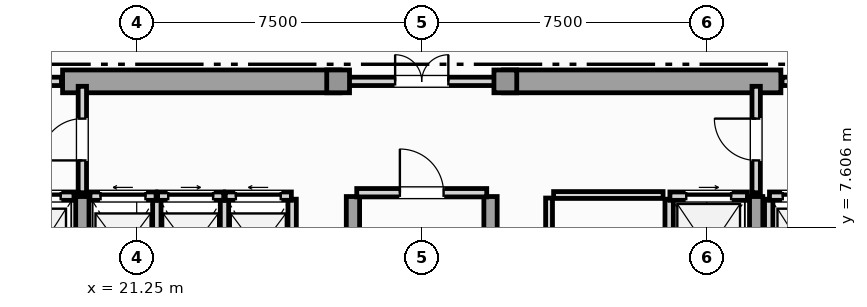
"""IFC4 building model, lengths in metres.
Left out: names, types, materials, properties, quantities, classifications, styles, units other than length and angle.
Written with IfcOpenShell. Run it as: python <this file> out.ifc"""

import sys

from ifc_helpers import new_model, si_unit, direction, frame, frame_2d, origin, origin_2d, place, context, subcontext, project, spatial, rectangle, extrude, element, fill, save


model = new_model("IFC4")
c1 = context("Model", 3, precision=1e-05, world=origin(), true_north=direction((0.0, 1.0)))
c2 = subcontext(c1, "Body", "Model", "MODEL_VIEW")
j1 = project(units=[si_unit("LENGTHUNIT", "METRE"), si_unit("PLANEANGLEUNIT", "RADIAN")], contexts=[c1])
p1 = place(None, origin())
s1 = spatial("IfcSite", under=j1, at=p1, CompositionType="ELEMENT")
p2 = place(p1, origin())
s2 = spatial("IfcBuilding", under=s1, at=p2, CompositionType="ELEMENT")
p3 = place(p2, frame((0.0, 0.0, 260.6)))
s3 = spatial("IfcBuildingStorey", under=s2, at=p3, CompositionType="ELEMENT", Elevation=260.6)
for number, where, z_axis, x_axis in (
    (1, (19.3, 11.45, 0.0), (0.0, 0.0, 1.0), (1.0, 0.0, 0.0)),
    (2, (30.9, 11.45, 0.0), (0.0, 0.0, 1.0), (1.0, 0.0, 0.0)),
):
    element("IfcWall", number, at=place(p3, frame(where, z_axis=z_axis, x_axis=x_axis)), inside=s3, PredefinedType="SHEAR", context=c2, shape_type="SweptSolid", body=[
        extrude(rectangle(XDim=7.3, YDim=0.6, at=frame_2d((3.65, 0.0))), origin(), (0.0, 0.0, 1.0), 3.65),
    ])
for number, where, z_axis, x_axis in (
    (3, (19.82, 0.92, 0.0), (0.0, 0.0, 1.0), (0.0, 1.0, 0.0)),
    (4, (26.94, 0.92, 0.0), (0.0, 0.0, 1.0), (0.0, 1.0, 0.0)),
    (5, (30.56, 0.92, 0.0), (0.0, 0.0, 1.0), (0.0, 1.0, 0.0)),
    (6, (37.55, 0.92, 0.0), (0.0, 0.0, 1.0), (0.0, 1.0, 0.0)),
):
    element("IfcWall", number, at=place(p3, frame(where, z_axis=z_axis, x_axis=x_axis)), inside=s3, PredefinedType="SHEAR", context=c2, shape_type="SweptSolid", body=[
        extrude(rectangle(XDim=7.5, YDim=0.35, at=frame_2d((3.75, 0.0))), origin(), (0.0, 0.0, 1.0), 3.65),
    ])
for number, where, z_axis, x_axis in (
    (7, (26.55, 11.45, 0.0), (0.0, 0.0, 1.0), (1.0, 0.0, 0.0)),
    (8, (30.95, 11.45, 0.0), (0.0, 0.0, 1.0), (1.0, 0.0, 0.0)),
):
    element("IfcColumn", number, at=place(p3, frame(where, z_axis=z_axis, x_axis=x_axis)), inside=s3, PredefinedType="COLUMN", context=c2, shape_type="SweptSolid", body=[
        extrude(rectangle(XDim=0.6, YDim=0.6, at=origin_2d()), origin(), (0.0, 0.0, 1.0), 3.85),
    ])
p4 = place(p3, frame((17.78, 8.43, 0.0), z_axis=(0.0, 0.0, 1.0), x_axis=(1.0, 0.0, 0.0)))
e9 = element("IfcWall", 9, at=p4, inside=s3, PredefinedType="SOLIDWALL", context=c2, shape_type="SweptSolid", body=[
    extrude(rectangle(XDim=1.82, YDim=0.22, at=frame_2d((0.91, 0.0))), origin(), (0.0, 0.0, 1.0), 3.65),
])
p5 = place(p4, frame((0.35, 0.0, 0.0)))
e10 = element("IfcOpeningElement", 10, at=p5, cuts=e9, PredefinedType="OPENING", context=c2, shape_type="SweptSolid", body=[
    extrude(rectangle(XDim=1.12, YDim=2.25, at=frame_2d((0.56, 1.125))), frame((0.0, 0.12, 0.0), z_axis=(0.0, -1.0, 0.0), x_axis=(1.0, 0.0, 0.0)), (0.0, 0.0, 1.0), 0.24),
])
p6 = place(p3, frame((37.88, 5.65, 0.0), z_axis=(0.0, 0.0, 1.0), x_axis=(0.0, 1.0, 0.0)))
e11 = element("IfcWall", 11, at=p6, inside=s3, PredefinedType="SOLIDWALL", context=c2, shape_type="SweptSolid", body=[
    extrude(rectangle(XDim=2.7, YDim=0.22, at=frame_2d((1.35, 0.0))), origin(), (0.0, 0.0, 1.0), 3.65),
])
p7 = place(p3, frame((37.9, 8.43, 0.0), z_axis=(0.0, 0.0, 1.0), x_axis=(1.0, 0.0, 0.0)))
e12 = element("IfcWall", 12, at=p7, inside=s3, PredefinedType="SOLIDWALL", context=c2, shape_type="SweptSolid", body=[
    extrude(rectangle(XDim=1.82, YDim=0.22, at=frame_2d((0.91, 0.0))), origin(), (0.0, 0.0, 1.0), 3.65),
])
p8 = place(p7, frame((0.35, 0.0, 0.0)))
e13 = element("IfcOpeningElement", 13, at=p8, cuts=e12, PredefinedType="OPENING", context=c2, shape_type="SweptSolid", body=[
    extrude(rectangle(XDim=1.12, YDim=2.25, at=frame_2d((0.56, 1.125))), frame((0.0, 0.12, 0.0), z_axis=(0.0, -1.0, 0.0), x_axis=(1.0, 0.0, 0.0)), (0.0, 0.0, 1.0), 0.24),
])
p9 = place(p3, frame((35.26, 5.65, 0.0), z_axis=(0.0, 0.0, 1.0), x_axis=(0.0, 1.0, 0.0)))
e14 = element("IfcWall", 14, at=p9, inside=s3, PredefinedType="SOLIDWALL", context=c2, shape_type="SweptSolid", body=[
    extrude(rectangle(XDim=2.7, YDim=0.22, at=frame_2d((1.35, 0.0))), origin(), (0.0, 0.0, 1.0), 3.65),
])
p10 = place(p3, frame((35.28, 8.43, 0.0), z_axis=(0.0, 0.0, 1.0), x_axis=(1.0, 0.0, 0.0)))
e15 = element("IfcWall", 15, at=p10, inside=s3, PredefinedType="SOLIDWALL", context=c2, shape_type="SweptSolid", body=[
    extrude(rectangle(XDim=2.04, YDim=0.22, at=frame_2d((1.02, 0.0))), origin(), (0.0, 0.0, 1.0), 3.65),
])
p11 = place(p10, frame((0.43, 0.0, 0.0)))
e16 = element("IfcOpeningElement", 16, at=p11, cuts=e15, PredefinedType="OPENING", context=c2, shape_type="SweptSolid", body=[
    extrude(rectangle(XDim=1.18, YDim=2.2, at=frame_2d((0.59, 1.1))), frame((0.0, 0.12, 0.0), z_axis=(0.0, -1.0, 0.0), x_axis=(1.0, 0.0, 0.0)), (0.0, 0.0, 1.0), 0.24),
])
p12 = place(p3, frame((21.78, 5.65, 0.0), z_axis=(0.0, 0.0, 1.0), x_axis=(0.0, 1.0, 0.0)))
e17 = element("IfcWall", 17, at=p12, inside=s3, PredefinedType="SOLIDWALL", context=c2, shape_type="SweptSolid", body=[
    extrude(rectangle(XDim=2.7, YDim=0.22, at=frame_2d((1.35, 0.0))), origin(), (0.0, 0.0, 1.0), 3.65),
])
p13 = place(p3, frame((20.02, 8.43, 0.0), z_axis=(0.0, 0.0, 1.0), x_axis=(1.0, 0.0, 0.0)))
e18 = element("IfcWall", 18, at=p13, inside=s3, PredefinedType="SOLIDWALL", context=c2, shape_type="SweptSolid", body=[
    extrude(rectangle(XDim=1.74, YDim=0.22, at=frame_2d((0.87, 0.0))), origin(), (0.0, 0.0, 1.0), 3.65),
])
p14 = place(p13, frame((0.28, 0.0, 0.0)))
e19 = element("IfcOpeningElement", 19, at=p14, cuts=e18, PredefinedType="OPENING", context=c2, shape_type="SweptSolid", body=[
    extrude(rectangle(XDim=1.18, YDim=2.2, at=frame_2d((0.59, 1.1))), frame((0.0, 0.12, 0.0), z_axis=(0.0, -1.0, 0.0), x_axis=(1.0, 0.0, 0.0)), (0.0, 0.0, 1.0), 0.24),
])
p15 = place(p3, frame((23.56, 5.65, 0.0), z_axis=(0.0, 0.0, 1.0), x_axis=(0.0, 1.0, 0.0)))
e20 = element("IfcWall", 20, at=p15, inside=s3, PredefinedType="SOLIDWALL", context=c2, shape_type="SweptSolid", body=[
    extrude(rectangle(XDim=2.7, YDim=0.22, at=frame_2d((1.35, 0.0))), origin(), (0.0, 0.0, 1.0), 3.65),
])
p16 = place(p3, frame((21.8, 8.43, 0.0), z_axis=(0.0, 0.0, 1.0), x_axis=(1.0, 0.0, 0.0)))
e21 = element("IfcWall", 21, at=p16, inside=s3, PredefinedType="SOLIDWALL", context=c2, shape_type="SweptSolid", body=[
    extrude(rectangle(XDim=1.74, YDim=0.22, at=frame_2d((0.87, 0.0))), origin(), (0.0, 0.0, 1.0), 3.65),
])
p17 = place(p16, frame((0.28, 0.0, 0.0)))
e22 = element("IfcOpeningElement", 22, at=p17, cuts=e21, PredefinedType="OPENING", context=c2, shape_type="SweptSolid", body=[
    extrude(rectangle(XDim=1.18, YDim=2.2, at=frame_2d((0.59, 1.1))), frame((0.0, 0.12, 0.0), z_axis=(0.0, -1.0, 0.0), x_axis=(1.0, 0.0, 0.0)), (0.0, 0.0, 1.0), 0.24),
])
p18 = place(p3, frame((25.34, 5.65, 0.0), z_axis=(0.0, 0.0, 1.0), x_axis=(0.0, 1.0, 0.0)))
e23 = element("IfcWall", 23, at=p18, inside=s3, PredefinedType="SOLIDWALL", context=c2, shape_type="SweptSolid", body=[
    extrude(rectangle(XDim=2.7, YDim=0.22, at=frame_2d((1.35, 0.0))), origin(), (0.0, 0.0, 1.0), 3.65),
])
p19 = place(p3, frame((23.58, 8.43, 0.0), z_axis=(0.0, 0.0, 1.0), x_axis=(1.0, 0.0, 0.0)))
e24 = element("IfcWall", 24, at=p19, inside=s3, PredefinedType="SOLIDWALL", context=c2, shape_type="SweptSolid", body=[
    extrude(rectangle(XDim=1.74, YDim=0.22, at=frame_2d((0.87, 0.0))), origin(), (0.0, 0.0, 1.0), 3.65),
])
p20 = place(p19, frame((0.28, 0.0, 0.0)))
e25 = element("IfcOpeningElement", 25, at=p20, cuts=e24, PredefinedType="OPENING", context=c2, shape_type="SweptSolid", body=[
    extrude(rectangle(XDim=1.18, YDim=2.2, at=frame_2d((0.59, 1.1))), frame((0.0, 0.12, 0.0), z_axis=(0.0, -1.0, 0.0), x_axis=(1.0, 0.0, 0.0)), (0.0, 0.0, 1.0), 0.24),
])
p21 = place(p3, frame((27.04, 8.52, 0.0), z_axis=(0.0, 0.0, 1.0), x_axis=(1.0, 0.0, 0.0)))
e26 = element("IfcWall", 26, at=p21, inside=s3, PredefinedType="SOLIDWALL", context=c2, shape_type="SweptSolid", body=[
    extrude(rectangle(XDim=3.42, YDim=0.22, at=frame_2d((1.71, 0.0))), origin(), (0.0, 0.0, 1.0), 3.65),
])
p22 = place(p21, frame((1.135, 0.0, 0.0)))
e27 = element("IfcOpeningElement", 27, at=p22, cuts=e26, PredefinedType="OPENING", context=c2, shape_type="SweptSolid", body=[
    extrude(rectangle(XDim=1.15, YDim=2.2, at=frame_2d((0.575, 1.1))), frame((0.0, 0.12, 0.0), z_axis=(0.0, -1.0, 0.0), x_axis=(1.0, 0.0, 0.0)), (0.0, 0.0, 1.0), 0.24),
])
p23 = place(p3, frame((19.82, 8.52, 0.0), z_axis=(0.0, 0.0, 1.0), x_axis=(0.0, 1.0, 0.0)))
e28 = element("IfcWall", 28, at=p23, inside=s3, PredefinedType="SOLIDWALL", context=c2, shape_type="SweptSolid", body=[
    extrude(rectangle(XDim=2.8, YDim=0.22, at=frame_2d((1.4, 0.0))), origin(), (0.0, 0.0, 1.0), 3.105),
])
p24 = place(p23, frame((0.85, 0.0, 0.0)))
e29 = element("IfcOpeningElement", 29, at=p24, cuts=e28, PredefinedType="OPENING", context=c2, shape_type="SweptSolid", body=[
    extrude(rectangle(XDim=1.1, YDim=2.2, at=frame_2d((0.55, 1.1))), frame((0.0, 0.12, 0.0), z_axis=(0.0, -1.0, 0.0), x_axis=(1.0, 0.0, 0.0)), (0.0, 0.0, 1.0), 0.24),
])
p25 = place(p3, frame((37.55, 8.52, 0.0), z_axis=(0.0, 0.0, 1.0), x_axis=(0.0, 1.0, 0.0)))
e30 = element("IfcWall", 30, at=p25, inside=s3, PredefinedType="SOLIDWALL", context=c2, shape_type="SweptSolid", body=[
    extrude(rectangle(XDim=2.8, YDim=0.22, at=frame_2d((1.4, 0.0))), origin(), (0.0, 0.0, 1.0), 3.105),
])
p26 = place(p25, frame((0.85, 0.0, 0.0)))
e31 = element("IfcOpeningElement", 31, at=p26, cuts=e30, PredefinedType="OPENING", context=c2, shape_type="SweptSolid", body=[
    extrude(rectangle(XDim=1.1, YDim=2.2, at=frame_2d((0.55, 1.1))), frame((0.0, 0.12, 0.0), z_axis=(0.0, -1.0, 0.0), x_axis=(1.0, 0.0, 0.0)), (0.0, 0.0, 1.0), 0.24),
])
p27 = place(p3, frame((16.23, 11.45, 0.0), z_axis=(0.0, 0.0, 1.0), x_axis=(1.0, 0.0, 0.0)))
e32 = element("IfcWall", 32, at=p27, inside=s3, PredefinedType="SOLIDWALL", context=c2, shape_type="SweptSolid", body=[
    extrude(rectangle(XDim=3.04, YDim=0.22, at=frame_2d((1.52, 0.0))), origin(), (0.0, 0.0, 1.0), 3.65),
])
p28 = place(p27, frame((0.97, 0.0, 0.0)))
e33 = element("IfcOpeningElement", 33, at=p28, cuts=e32, PredefinedType="OPENING", context=c2, shape_type="SweptSolid", body=[
    extrude(rectangle(XDim=1.1, YDim=2.2, at=frame_2d((0.55, 1.1))), frame((0.0, 0.12, 0.0), z_axis=(0.0, -1.0, 0.0), x_axis=(1.0, 0.0, 0.0)), (0.0, 0.0, 1.0), 0.24),
])
p29 = place(p3, frame((26.63, 11.45, 0.0), z_axis=(0.0, 0.0, 1.0), x_axis=(1.0, 0.0, 0.0)))
e34 = element("IfcWall", 34, at=p29, inside=s3, PredefinedType="SOLIDWALL", context=c2, shape_type="SweptSolid", body=[
    extrude(rectangle(XDim=4.24, YDim=0.22, at=frame_2d((2.12, 0.0))), origin(), (0.0, 0.0, 1.0), 3.65),
])
p30 = place(p29, frame((1.42, 0.0, 0.0)))
e35 = element("IfcOpeningElement", 35, at=p30, cuts=e34, PredefinedType="OPENING", context=c2, shape_type="SweptSolid", body=[
    extrude(rectangle(XDim=1.4, YDim=2.2, at=frame_2d((0.7, 1.1))), frame((0.0, 0.12, 0.0), z_axis=(0.0, -1.0, 0.0), x_axis=(1.0, 0.0, 0.0)), (0.0, 0.0, 1.0), 0.24),
])
p31 = place(p3, frame((38.23, 11.45, 0.0), z_axis=(0.0, 0.0, 1.0), x_axis=(1.0, 0.0, 0.0)))
e36 = element("IfcWall", 36, at=p31, inside=s3, PredefinedType="SOLIDWALL", context=c2, shape_type="SweptSolid", body=[
    extrude(rectangle(XDim=3.04, YDim=0.22, at=frame_2d((1.52, 0.0))), origin(), (0.0, 0.0, 1.0), 3.65),
])
p32 = place(p31, frame((0.97, 0.0, 0.0)))
e37 = element("IfcOpeningElement", 37, at=p32, cuts=e36, PredefinedType="OPENING", context=c2, shape_type="SweptSolid", body=[
    extrude(rectangle(XDim=1.1, YDim=2.2, at=frame_2d((0.55, 1.1))), frame((0.0, 0.12, 0.0), z_axis=(0.0, -1.0, 0.0), x_axis=(1.0, 0.0, 0.0)), (0.0, 0.0, 1.0), 0.24),
])
p33 = place(p3, frame((32.1, 5.65, 0.0), z_axis=(0.0, 0.0, 1.0), x_axis=(0.0, 1.0, 0.0)))
e38 = element("IfcWall", 38, at=p33, inside=s3, PredefinedType="PARTITIONING", context=c2, shape_type="SweptSolid", body=[
    extrude(rectangle(XDim=2.73, YDim=0.18, at=frame_2d((1.365, 0.0))), origin(), (0.0, 0.0, 1.0), 3.65),
])
p34 = place(p33, frame((0.84, 0.0, 0.0)))
e39 = element("IfcOpeningElement", 39, at=p34, cuts=e38, PredefinedType="OPENING", context=c2, shape_type="SweptSolid", body=[
    extrude(rectangle(XDim=1.05, YDim=2.15, at=frame_2d((0.525, 1.075))), frame((0.0, 0.1, 0.0), z_axis=(0.0, -1.0, 0.0), x_axis=(1.0, 0.0, 0.0)), (0.0, 0.0, 1.0), 0.2),
])
p35 = place(p3, frame((32.22, 8.46, 0.0), z_axis=(0.0, 0.0, 1.0), x_axis=(1.0, 0.0, 0.0)))
e40 = element("IfcWall", 40, at=p35, inside=s3, PredefinedType="PARTITIONING", context=c2, shape_type="SweptSolid", body=[
    extrude(rectangle(XDim=2.88, YDim=0.18, at=frame_2d((1.44, 0.0))), origin(), (0.0, 0.0, 1.0), 3.65),
])
p36 = place(p5, origin())
e41 = element("IfcDoor", 41, at=p36, inside=s3, OperationType="SLIDING_TO_RIGHT", PredefinedType="DOOR", context=c2, shape_type="SweptSolid", body=[
    extrude(rectangle(XDim=1.12, YDim=2.25, at=frame_2d((0.56, 1.125))), frame((0.0, 0.025, 0.0), z_axis=(0.0, -1.0, 0.0), x_axis=(1.0, 0.0, 0.0)), (0.0, 0.0, 1.0), 0.05),
])
fill(e10, e41)
p37 = place(p8, origin())
e42 = element("IfcDoor", 42, at=p37, inside=s3, OperationType="SLIDING_TO_LEFT", PredefinedType="DOOR", context=c2, shape_type="SweptSolid", body=[
    extrude(rectangle(XDim=1.12, YDim=2.25, at=frame_2d((0.56, 1.125))), frame((0.0, 0.025, 0.0), z_axis=(0.0, -1.0, 0.0), x_axis=(1.0, 0.0, 0.0)), (0.0, 0.0, 1.0), 0.05),
])
fill(e13, e42)
p38 = place(p11, origin())
e43 = element("IfcDoor", 43, at=p38, inside=s3, OperationType="SLIDING_TO_RIGHT", PredefinedType="DOOR", context=c2, shape_type="SweptSolid", body=[
    extrude(rectangle(XDim=1.18, YDim=2.2, at=frame_2d((0.59, 1.1))), frame((0.0, 0.025, 0.0), z_axis=(0.0, -1.0, 0.0), x_axis=(1.0, 0.0, 0.0)), (0.0, 0.0, 1.0), 0.05),
])
fill(e16, e43)
p39 = place(p14, origin())
e44 = element("IfcDoor", 44, at=p39, inside=s3, OperationType="SLIDING_TO_LEFT", PredefinedType="DOOR", context=c2, shape_type="SweptSolid", body=[
    extrude(rectangle(XDim=1.18, YDim=2.2, at=frame_2d((0.59, 1.1))), frame((0.0, 0.025, 0.0), z_axis=(0.0, -1.0, 0.0), x_axis=(1.0, 0.0, 0.0)), (0.0, 0.0, 1.0), 0.05),
])
fill(e19, e44)
p40 = place(p17, origin())
e45 = element("IfcDoor", 45, at=p40, inside=s3, OperationType="SLIDING_TO_RIGHT", PredefinedType="DOOR", context=c2, shape_type="SweptSolid", body=[
    extrude(rectangle(XDim=1.18, YDim=2.2, at=frame_2d((0.59, 1.1))), frame((0.0, 0.025, 0.0), z_axis=(0.0, -1.0, 0.0), x_axis=(1.0, 0.0, 0.0)), (0.0, 0.0, 1.0), 0.05),
])
fill(e22, e45)
p41 = place(p20, origin())
e46 = element("IfcDoor", 46, at=p41, inside=s3, OperationType="SLIDING_TO_LEFT", PredefinedType="DOOR", context=c2, shape_type="SweptSolid", body=[
    extrude(rectangle(XDim=1.18, YDim=2.2, at=frame_2d((0.59, 1.1))), frame((0.0, 0.025, 0.0), z_axis=(0.0, -1.0, 0.0), x_axis=(1.0, 0.0, 0.0)), (0.0, 0.0, 1.0), 0.05),
])
fill(e25, e46)
p42 = place(p22, origin())
e47 = element("IfcDoor", 47, at=p42, inside=s3, OperationType="SINGLE_SWING_LEFT", PredefinedType="DOOR", context=c2, shape_type="SweptSolid", body=[
    extrude(rectangle(XDim=1.15, YDim=2.2, at=frame_2d((0.575, 1.1))), frame((0.0, 0.025, 0.0), z_axis=(0.0, -1.0, 0.0), x_axis=(1.0, 0.0, 0.0)), (0.0, 0.0, 1.0), 0.05),
])
fill(e27, e47)
p43 = place(p24, origin())
e48 = element("IfcDoor", 48, at=p43, inside=s3, OperationType="SINGLE_SWING_LEFT", PredefinedType="DOOR", context=c2, shape_type="SweptSolid", body=[
    extrude(rectangle(XDim=1.1, YDim=2.2, at=frame_2d((0.55, 1.1))), frame((0.0, 0.025, 0.0), z_axis=(0.0, -1.0, 0.0), x_axis=(1.0, 0.0, 0.0)), (0.0, 0.0, 1.0), 0.05),
])
fill(e29, e48)
p44 = place(p26, origin())
e49 = element("IfcDoor", 49, at=p44, inside=s3, OperationType="SINGLE_SWING_RIGHT", PredefinedType="DOOR", context=c2, shape_type="SweptSolid", body=[
    extrude(rectangle(XDim=1.1, YDim=2.2, at=frame_2d((0.55, 1.1))), frame((0.0, 0.025, 0.0), z_axis=(0.0, -1.0, 0.0), x_axis=(1.0, 0.0, 0.0)), (0.0, 0.0, 1.0), 0.05),
])
fill(e31, e49)
p45 = place(p30, origin())
e50 = element("IfcDoor", 50, at=p45, inside=s3, OperationType="DOUBLE_DOOR_SINGLE_SWING", PredefinedType="DOOR", context=c2, shape_type="SweptSolid", body=[
    extrude(rectangle(XDim=1.4, YDim=2.2, at=frame_2d((0.7, 1.1))), frame((0.0, 0.025, 0.0), z_axis=(0.0, -1.0, 0.0), x_axis=(1.0, 0.0, 0.0)), (0.0, 0.0, 1.0), 0.05),
])
fill(e35, e50)
save(model, sys.argv[1])
